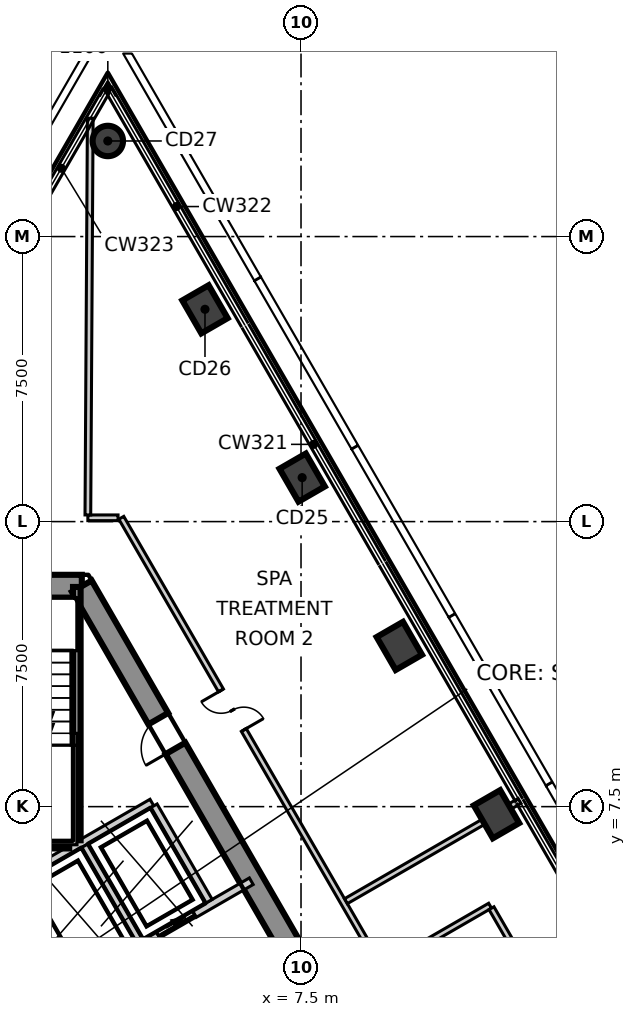
"""IFC4 building model, lengths in metres.
Left out: names, types, materials, properties, quantities, classifications, styles, units other than length and angle.
Written with IfcOpenShell. Run it as: python <this file> out.ifc"""

import sys

from ifc_helpers import new_model, si_unit, direction, frame, frame_2d, origin, origin_2d, place, context, subcontext, project, spatial, polyline, rectangle, circle, outline, extrude, element, fill, save


model = new_model("IFC4")
c1 = context("Model", 3, precision=1e-05, world=origin(), true_north=direction((0.0, 1.0)))
c2 = subcontext(c1, "Body", "Model", "MODEL_VIEW")
j1 = project(units=[si_unit("LENGTHUNIT", "METRE"), si_unit("PLANEANGLEUNIT", "RADIAN")], contexts=[c1])
p1 = place(None, origin())
s1 = spatial("IfcSite", under=j1, at=p1, CompositionType="ELEMENT")
p2 = place(p1, origin())
s2 = spatial("IfcBuilding", under=s1, at=p2, CompositionType="ELEMENT")
p3 = place(p2, frame((0.0, 0.0, 322.3)))
s3 = spatial("IfcBuildingStorey", under=s2, at=p3, CompositionType="ELEMENT", Elevation=322.3)
p4 = place(p3, frame((1.732, 13.3, -0.3), z_axis=(0.0, 0.0, 1.0), x_axis=(-1.0, 0.0, 0.0)))
e1 = element("IfcWall", 1, at=p4, inside=s3, PredefinedType="SHEAR", context=c2, shape_type="SweptSolid", body=[
    extrude(outline(polyline([(-0.173, -0.3), (1.732, -0.3), (3.637, -0.3), (3.291, 0.3), (1.732, 0.3), (0.173, 0.3), (-0.173, -0.3)])), origin(), (0.0, 0.0, 1.0), 5.35),
])
p5 = place(p4, frame((1.032, 0.0, 0.3)))
e2 = element("IfcOpeningElement", 2, at=p5, cuts=e1, PredefinedType="OPENING", context=c2, shape_type="SweptSolid", body=[
    extrude(rectangle(XDim=1.4, YDim=2.1, at=frame_2d((0.7, 1.05))), frame((0.0, 0.31, 0.0), z_axis=(0.0, -1.0, 0.0), x_axis=(1.0, 0.0, 0.0)), (0.0, 0.0, 1.0), 0.62),
])
p6 = place(p3, frame((12.384, -5.15, -0.3), z_axis=(0.0, 0.0, 1.0), x_axis=(-0.500000539815, 0.866025092122, 0.0)))
e3 = element("IfcWall", 3, at=p6, inside=s3, PredefinedType="SHEAR", context=c2, shape_type="SweptSolid", body=[
    extrude(outline(polyline([(-0.173, -0.301), (1.795, -0.301), (3.763, -0.301), (5.731, -0.301), (7.7, -0.301), (9.668, -0.301), (11.636, -0.301), (13.604, -0.3), (15.573, -0.3), (17.541, -0.3), (19.509, -0.3), (21.477, -0.3), (21.131, 0.3), (19.226, 0.3), (17.321, 0.3), (15.415, 0.3), (13.51, 0.3), (11.605, 0.3), (9.699, 0.3), (7.794, 0.3), (5.889, 0.3), (3.984, 0.3), (2.078, 0.3), (0.173, 0.3), (-0.173, -0.301)])), origin(), (0.0, 0.0, 1.0), 5.35),
])
p7 = place(p6, frame((16.378, 0.0, 0.3)))
e4 = element("IfcOpeningElement", 4, at=p7, cuts=e3, PredefinedType="OPENING", context=c2, shape_type="SweptSolid", body=[
    extrude(rectangle(XDim=0.9, YDim=2.1, at=frame_2d((0.45, 1.05))), frame((0.0, 0.31, 0.0), z_axis=(0.0, -1.0, 0.0), x_axis=(1.0, 0.0, 0.0)), (0.0, 0.0, 1.0), 0.621),
])
for number, where, z_axis, x_axis in (
    (5, (12.644, 7.3, -0.3), (0.0, 0.0, 1.0), (-0.5, 0.866, 0.0)),
    (6, (10.087, 11.729, -0.3), (0.0, 0.0, 1.0), (-0.5, 0.866, 0.0)),
    (7, (7.53, 16.157, -0.3), (0.0, 0.0, 1.0), (-0.5, 0.866, 0.0)),
    (8, (4.973, 20.586, -0.3), (0.0, 0.0, 1.0), (-0.5, 0.866, 0.0)),
):
    element("IfcColumn", number, at=place(p3, frame(where, z_axis=z_axis, x_axis=x_axis)), inside=s3, PredefinedType="COLUMN", context=c2, shape_type="SweptSolid", body=[
        extrude(rectangle(XDim=1.0, YDim=0.8, at=origin_2d()), origin(), (0.0, 0.0, 1.0), 5.35),
    ])
p8 = place(p3, frame((2.416, 25.015, -0.3), z_axis=(0.0, 0.0, 1.0), x_axis=(-0.5, 0.866025403784, 0.0)))
e9 = element("IfcColumn", 9, at=p8, inside=s3, PredefinedType="COLUMN", context=c2, shape_type="SweptSolid", body=[
    extrude(circle(Radius=0.4, at=origin_2d()), origin(), (0.0, 0.0, 1.0), 5.35),
])
p9 = place(p3, frame((2.771, 15.1, 0.0), z_axis=(0.0, 0.0, 1.0), x_axis=(0.500017691629, -0.866015189277, 0.0)))
e10 = element("IfcWall", 10, at=p9, inside=s3, PredefinedType="PARTITIONING", context=c2, shape_type="SweptSolid", body=[
    extrude(rectangle(XDim=23.383, YDim=0.15, at=frame_2d((11.691, 0.0))), origin(), (0.0, 0.0, 1.0), 5.05),
])
p10 = place(p9, frame((14.841, 0.0, 0.0)))
e11 = element("IfcOpeningElement", 11, at=p10, cuts=e10, PredefinedType="OPENING", context=c2, shape_type="SweptSolid", body=[
    extrude(rectangle(XDim=1.0, YDim=2.1, at=frame_2d((0.5, 1.05))), frame((0.0, 0.085, 0.0), z_axis=(0.0, -1.0, 0.0), x_axis=(1.0, 0.0, 0.0)), (0.0, 0.0, 1.0), 0.17),
])
p11 = place(p9, frame((5.246, 0.0, 0.0)))
e12 = element("IfcOpeningElement", 12, at=p11, cuts=e10, PredefinedType="OPENING", context=c2, shape_type="SweptSolid", body=[
    extrude(rectangle(XDim=1.2, YDim=2.1, at=frame_2d((0.6, 1.05))), frame((0.0, 0.085, 0.0), z_axis=(0.0, -1.0, 0.0), x_axis=(1.0, 0.0, 0.0)), (0.0, 0.0, 1.0), 0.17),
])
p12 = place(p3, frame((1.891, 15.1, 0.0), z_axis=(0.0, 0.0, 1.0), x_axis=(1.0, 0.0, 0.0)))
e13 = element("IfcWall", 13, at=p12, inside=s3, PredefinedType="PARTITIONING", context=c2, shape_type="SweptSolid", body=[
    extrude(rectangle(XDim=0.794, YDim=0.15, at=frame_2d((0.397, 0.0))), origin(), (0.0, 0.0, 1.0), 5.05),
])
p13 = place(p3, frame((1.891, 15.175, 0.0), z_axis=(0.0, 0.0, 1.0), x_axis=(0.006033848716, 0.999981796169, 0.0)))
e14 = element("IfcWall", 14, at=p13, inside=s3, PredefinedType="PARTITIONING", context=c2, shape_type="SweptSolid", body=[
    extrude(rectangle(XDim=10.439, YDim=0.15, at=frame_2d((5.22, 0.0))), origin(), (0.0, 0.0, 1.0), 5.05),
])
p14 = place(p3, frame((8.682, 5.012, 0.0), z_axis=(0.0, 0.0, 1.0), x_axis=(0.865981328726, 0.500076332472, 0.0)))
e15 = element("IfcWall", 15, at=p14, inside=s3, PredefinedType="PARTITIONING", context=c2, shape_type="SweptSolid", body=[
    extrude(rectangle(XDim=5.275, YDim=0.15, at=frame_2d((2.638, 0.0))), origin(), (0.0, 0.0, 1.0), 5.05),
])
p15 = place(p3, frame((9.682, 3.28, 0.0), z_axis=(0.0, 0.0, 1.0), x_axis=(0.86597507116, 0.50008716853, 0.0)))
e16 = element("IfcWall", 16, at=p15, inside=s3, PredefinedType="PARTITIONING", context=c2, shape_type="SweptSolid", body=[
    extrude(rectangle(XDim=3.226, YDim=0.15, at=frame_2d((1.613, 0.0))), origin(), (0.0, 0.0, 1.0), 5.05),
])
p16 = place(p3, frame((12.512, 4.828, 0.0), z_axis=(0.0, 0.0, 1.0), x_axis=(0.50011994908, -0.865956140074, 0.0)))
e17 = element("IfcWall", 17, at=p16, inside=s3, PredefinedType="PARTITIONING", context=c2, shape_type="SweptSolid", body=[
    extrude(rectangle(XDim=3.225, YDim=0.15, at=frame_2d((1.613, 0.0))), origin(), (0.0, 0.0, 1.0), 5.05),
])
p17 = place(p3, frame((-0.002, 5.542, 0.0), z_axis=(0.0, 0.0, 1.0), x_axis=(0.866103910842, 0.499863997127, 0.0)))
e18 = element("IfcWall", 18, at=p17, inside=s3, PredefinedType="SOLIDWALL", context=c2, shape_type="SweptSolid", body=[
    extrude(rectangle(XDim=4.131, YDim=0.2, at=frame_2d((2.065, 0.0))), origin(), (0.0, 0.0, 1.0), 5.05),
])
p18 = place(p3, frame((0.0, 5.4, 0.0), z_axis=(0.0, 0.0, 1.0), x_axis=(0.500103862429, -0.865965430478, 0.0)))
e19 = element("IfcWall", 19, at=p18, inside=s3, PredefinedType="SOLIDWALL", context=c2, shape_type="SweptSolid", body=[
    extrude(rectangle(XDim=2.973, YDim=0.2, at=frame_2d((1.487, 0.0))), origin(), (0.0, 0.0, 1.0), 5.05),
])
p19 = place(p18, frame((0.937, 0.0, 0.0)))
e20 = element("IfcOpeningElement", 20, at=p19, cuts=e19, PredefinedType="OPENING", context=c2, shape_type="SweptSolid", body=[
    extrude(rectangle(XDim=1.1, YDim=2.1, at=frame_2d((0.55, 1.05))), frame((0.0, 0.11, 0.0), z_axis=(0.0, -1.0, 0.0), x_axis=(1.0, 0.0, 0.0)), (0.0, 0.0, 1.0), 0.22),
])
p20 = place(p3, frame((1.578, 2.874, 0.0), z_axis=(0.0, 0.0, 1.0), x_axis=(0.866045911672, 0.499964477614, 0.0)))
e21 = element("IfcWall", 21, at=p20, inside=s3, PredefinedType="SOLIDWALL", context=c2, shape_type="SweptSolid", body=[
    extrude(rectangle(XDim=5.327, YDim=0.2, at=frame_2d((2.663, 0.0))), origin(), (0.0, 0.0, 1.0), 5.05),
])
p21 = place(p20, frame((2.496, 0.0, 0.0)))
e22 = element("IfcOpeningElement", 22, at=p21, cuts=e21, PredefinedType="OPENING", context=c2, shape_type="SweptSolid", body=[
    extrude(rectangle(XDim=1.1, YDim=2.1, at=frame_2d((0.55, 1.05))), frame((0.0, 0.11, 0.0), z_axis=(0.0, -1.0, 0.0), x_axis=(1.0, 0.0, 0.0)), (0.0, 0.0, 1.0), 0.22),
])
for number, where, z_axis, x_axis in (
    (23, (3.626, 7.52, 0.0), (0.0, 0.0, 1.0), (0.5, -0.866, 0.0)),
    (24, (1.807, 6.47, 0.0), (0.0, 0.0, 1.0), (0.5, -0.866, 0.0)),
):
    element("IfcWall", number, at=place(p3, frame(where, z_axis=z_axis, x_axis=x_axis)), inside=s3, PredefinedType="SOLIDWALL", context=c2, shape_type="SweptSolid", body=[
        extrude(rectangle(XDim=2.9, YDim=0.2, at=frame_2d((1.45, 0.0))), origin(), (0.0, 0.0, 1.0), 5.05),
    ])
p22 = place(p3, frame((1.6, 6.615, 0.0), z_axis=(0.0, 0.0, 1.0), x_axis=(0.0, 1.0, 0.0)))
e25 = element("IfcWall", 25, at=p22, inside=s3, PredefinedType="SOLIDWALL", context=c2, shape_type="SweptSolid", body=[
    extrude(rectangle(XDim=6.665, YDim=0.2, at=frame_2d((3.333, 0.0))), origin(), (0.0, 0.0, 1.0), 5.05),
])
p23 = place(p3, frame((-1.4, 6.5, 0.0), z_axis=(0.0, 0.0, 1.0), x_axis=(1.0, 0.0, 0.0)))
e26 = element("IfcWall", 26, at=p23, inside=s3, PredefinedType="SOLIDWALL", context=c2, shape_type="SweptSolid", body=[
    extrude(rectangle(XDim=2.8, YDim=0.2, at=frame_2d((1.4, 0.0))), origin(), (0.0, 0.0, 1.0), 5.05),
])
p24 = place(p19, origin())
e27 = element("IfcDoor", 27, at=p24, inside=s3, OperationType="SLIDING_TO_LEFT", PredefinedType="DOOR", context=c2, shape_type="SweptSolid", body=[
    extrude(rectangle(XDim=1.1, YDim=2.1, at=frame_2d((0.55, 1.05))), frame((0.0, 0.025, 0.0), z_axis=(0.0, -1.0, 0.0), x_axis=(1.0, 0.0, 0.0)), (0.0, 0.0, 1.0), 0.05),
])
fill(e20, e27)
p25 = place(p21, origin())
e28 = element("IfcDoor", 28, at=p25, inside=s3, OperationType="SLIDING_TO_LEFT", PredefinedType="DOOR", context=c2, shape_type="SweptSolid", body=[
    extrude(rectangle(XDim=1.1, YDim=2.1, at=frame_2d((0.55, 1.05))), frame((0.0, 0.025, 0.0), z_axis=(0.0, -1.0, 0.0), x_axis=(1.0, 0.0, 0.0)), (0.0, 0.0, 1.0), 0.05),
])
fill(e22, e28)
p26 = place(p11, origin())
e29 = element("IfcDoor", 29, at=p26, inside=s3, OperationType="DOUBLE_DOOR_SINGLE_SWING", PredefinedType="DOOR", context=c2, shape_type="SweptSolid", body=[
    extrude(rectangle(XDim=1.2, YDim=2.1, at=frame_2d((0.6, 1.05))), frame((0.0, 0.025, 0.0), z_axis=(0.0, -1.0, 0.0), x_axis=(1.0, 0.0, 0.0)), (0.0, 0.0, 1.0), 0.05),
])
fill(e12, e29)
p27 = place(p7, origin())
e30 = element("IfcDoor", 30, at=p27, inside=s3, OperationType="SINGLE_SWING_RIGHT", PredefinedType="DOOR", context=c2, shape_type="SweptSolid", body=[
    extrude(rectangle(XDim=0.9, YDim=2.1, at=frame_2d((0.45, 1.05))), frame((0.0, 0.025, 0.0), z_axis=(0.0, -1.0, 0.0), x_axis=(1.0, 0.0, 0.0)), (0.0, 0.0, 1.0), 0.05),
])
fill(e4, e30)
save(model, sys.argv[1])
